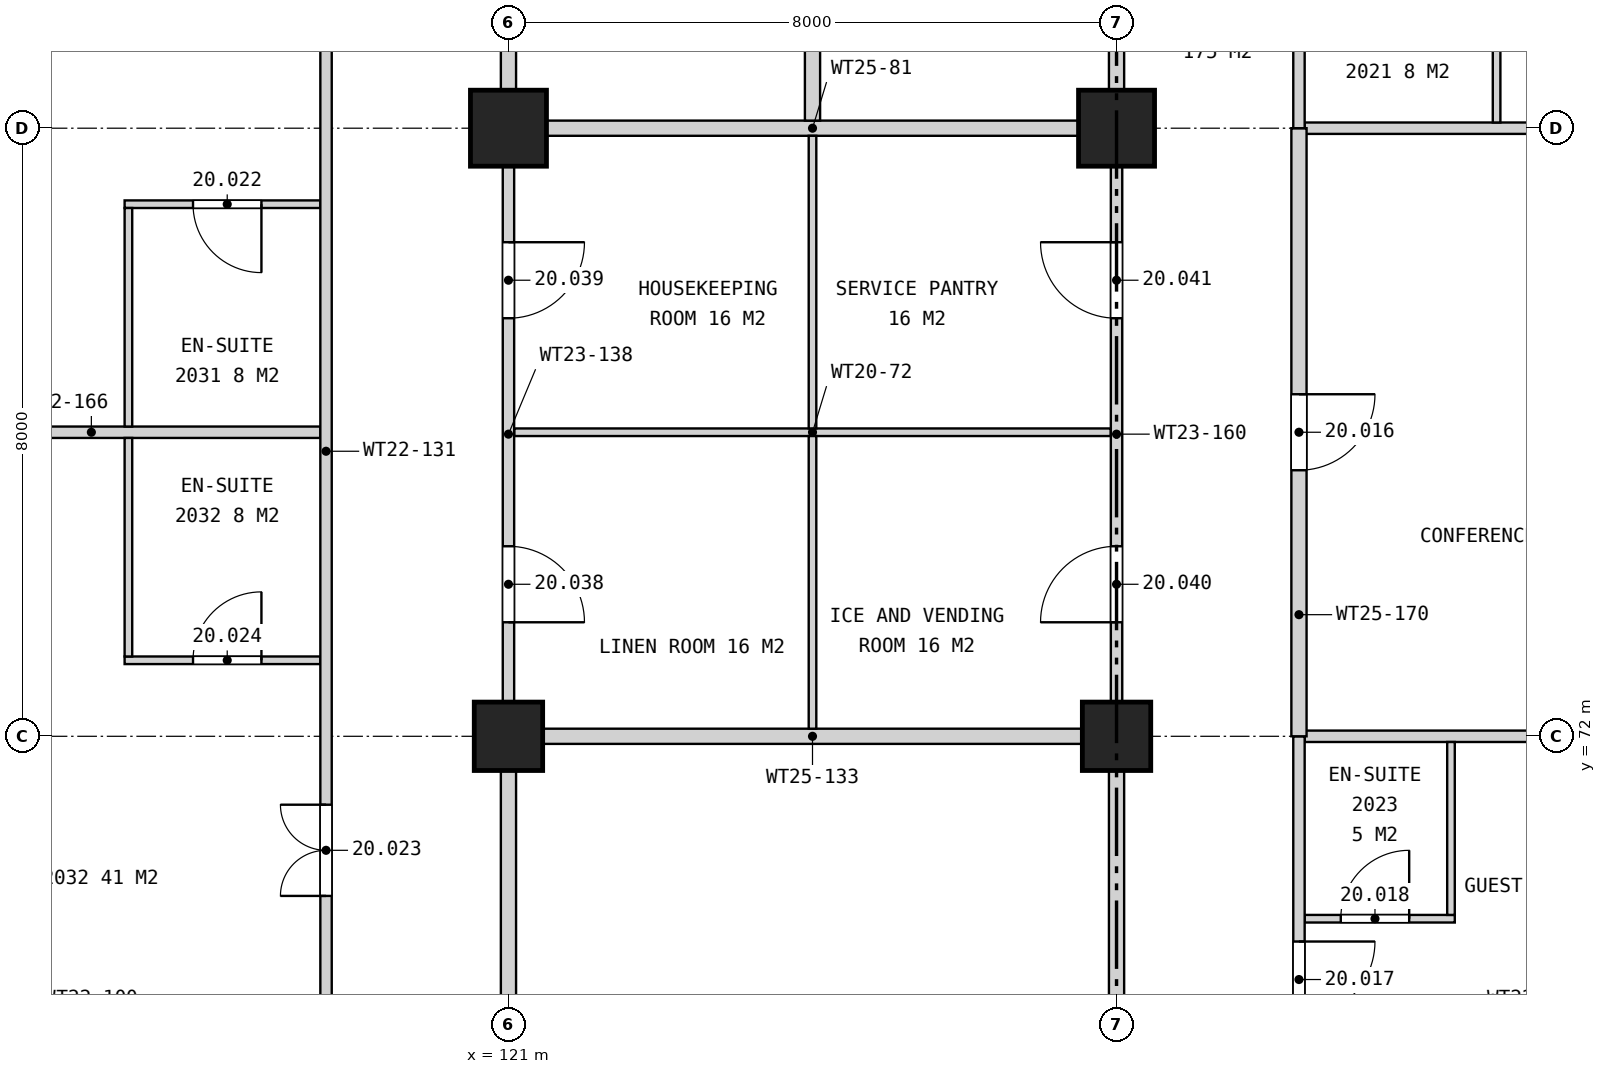
"""IFC4 building model, lengths in metres.
Left out: names, types, materials, properties, quantities, classifications, styles, units other than length and angle.
Written with IfcOpenShell. Run it as: python <this file> out.ifc"""

import sys

from ifc_helpers import new_model, si_unit, direction, frame, frame_2d, origin, origin_2d, place, context, subcontext, project, spatial, rectangle, extrude, element, fill, save


model = new_model("IFC4")
c1 = context("Model", 3, precision=1e-05, world=origin(), true_north=direction((0.0, 1.0)))
c2 = subcontext(c1, "Body", "Model", "MODEL_VIEW")
j1 = project(units=[si_unit("LENGTHUNIT", "METRE"), si_unit("PLANEANGLEUNIT", "RADIAN")], contexts=[c1])
p1 = place(None, origin())
s1 = spatial("IfcSite", under=j1, at=p1, CompositionType="ELEMENT")
p2 = place(p1, origin())
s2 = spatial("IfcBuilding", under=s1, at=p2, CompositionType="ELEMENT")
p3 = place(p2, frame((0.0, 0.0, 101.6)))
s3 = spatial("IfcBuildingStorey", under=s2, at=p3, CompositionType="ELEMENT", Elevation=101.6)
p4 = place(p3, frame((121.0, 72.0, 0.0), z_axis=(0.0, 0.0, 1.0), x_axis=(1.0, 0.0, 0.0)))
e1 = element("IfcColumn", 1, at=p4, inside=s3, PredefinedType="COLUMN", context=c2, shape_type="SweptSolid", body=[
    extrude(rectangle(XDim=0.9, YDim=0.9, at=origin_2d()), origin(), (0.0, 0.0, 1.0), 3.7),
])
p5 = place(p3, frame((121.0, 80.0, 0.0), z_axis=(0.0, 0.0, 1.0), x_axis=(1.0, 0.0, 0.0)))
e2 = element("IfcColumn", 2, at=p5, inside=s3, PredefinedType="COLUMN", context=c2, shape_type="SweptSolid", body=[
    extrude(rectangle(XDim=1.0, YDim=1.0, at=origin_2d()), origin(), (0.0, 0.0, 1.0), 3.7),
])
p6 = place(p3, frame((129.0, 72.0, 0.0), z_axis=(0.0, 0.0, 1.0), x_axis=(1.0, 0.0, 0.0)))
e3 = element("IfcColumn", 3, at=p6, inside=s3, PredefinedType="COLUMN", context=c2, shape_type="SweptSolid", body=[
    extrude(rectangle(XDim=0.9, YDim=0.9, at=origin_2d()), origin(), (0.0, 0.0, 1.0), 3.7),
])
p7 = place(p3, frame((129.0, 80.0, 0.0), z_axis=(0.0, 0.0, 1.0), x_axis=(1.0, 0.0, 0.0)))
e4 = element("IfcColumn", 4, at=p7, inside=s3, PredefinedType="COLUMN", context=c2, shape_type="SweptSolid", body=[
    extrude(rectangle(XDim=1.0, YDim=1.0, at=origin_2d()), origin(), (0.0, 0.0, 1.0), 3.7),
])
p8 = place(p3, frame((131.475, 69.6, 0.0), z_axis=(0.0, 0.0, 1.0), x_axis=(1.0, 0.0, 0.0)))
e5 = element("IfcWall", 5, at=p8, inside=s3, PredefinedType="PLUMBINGWALL", context=c2, shape_type="SweptSolid", body=[
    extrude(rectangle(XDim=1.975, YDim=0.1, at=frame_2d((0.987, 0.0))), origin(), (0.0, 0.0, 1.0), 3.7),
])
p9 = place(p8, frame((0.475, 0.0, 0.0)))
e6 = element("IfcOpeningElement", 6, at=p9, cuts=e5, PredefinedType="OPENING", context=c2, shape_type="SweptSolid", body=[
    extrude(rectangle(XDim=0.9, YDim=2.1, at=frame_2d((0.45, 1.05))), frame((0.0, 0.06, 0.0), z_axis=(0.0, -1.0, 0.0), x_axis=(1.0, 0.0, 0.0)), (0.0, 0.0, 1.0), 0.12),
])
p10 = place(p3, frame((121.45, 72.0, 0.0), z_axis=(0.0, 0.0, 1.0), x_axis=(1.0, 0.0, 0.0)))
e7 = element("IfcWall", 7, at=p10, inside=s3, PredefinedType="PARTITIONING", context=c2, shape_type="SweptSolid", body=[
    extrude(rectangle(XDim=7.1, YDim=0.2, at=frame_2d((3.55, 0.0))), origin(), (0.0, 0.0, 1.0), 2.76),
])
p11 = place(p3, frame((131.475, 72.0, 0.0), z_axis=(0.0, 0.0, 1.0), x_axis=(1.0, 0.0, 0.0)))
e8 = element("IfcWall", 8, at=p11, inside=s3, PredefinedType="PARTITIONING", context=c2, shape_type="SweptSolid", body=[
    extrude(rectangle(XDim=5.125, YDim=0.15, at=frame_2d((2.562, 0.0))), origin(), (0.0, 0.0, 1.0), 2.76),
])
p12 = place(p3, frame((115.95, 73.0, 0.0), z_axis=(0.0, 0.0, 1.0), x_axis=(1.0, 0.0, 0.0)))
e9 = element("IfcWall", 9, at=p12, inside=s3, PredefinedType="PLUMBINGWALL", context=c2, shape_type="SweptSolid", body=[
    extrude(rectangle(XDim=2.575, YDim=0.1, at=frame_2d((1.288, 0.0))), origin(), (0.0, 0.0, 1.0), 3.7),
])
p13 = place(p12, frame((0.9, 0.0, 0.0)))
e10 = element("IfcOpeningElement", 10, at=p13, cuts=e9, PredefinedType="OPENING", context=c2, shape_type="SweptSolid", body=[
    extrude(rectangle(XDim=0.9, YDim=2.1, at=frame_2d((0.45, 1.05))), frame((0.0, 0.06, 0.0), z_axis=(0.0, -1.0, 0.0), x_axis=(1.0, 0.0, 0.0)), (0.0, 0.0, 1.0), 0.12),
])
p14 = place(p3, frame((112.5, 76.0, 0.0), z_axis=(0.0, 0.0, 1.0), x_axis=(1.0, 0.0, 0.0)))
e11 = element("IfcWall", 11, at=p14, inside=s3, PredefinedType="PARTITIONING", context=c2, shape_type="SweptSolid", body=[
    extrude(rectangle(XDim=6.025, YDim=0.15, at=frame_2d((3.012, 0.0))), origin(), (0.0, 0.0, 1.0), 2.843),
])
p15 = place(p3, frame((121.075, 76.0, 0.0), z_axis=(0.0, 0.0, 1.0), x_axis=(1.0, 0.0, 0.0)))
e12 = element("IfcWall", 12, at=p15, inside=s3, PredefinedType="PARTITIONING", context=c2, shape_type="SweptSolid", body=[
    extrude(rectangle(XDim=7.85, YDim=0.1, at=frame_2d((3.925, 0.0))), origin(), (0.0, 0.0, 1.0), 2.843),
])
p16 = place(p3, frame((115.95, 79.0, 0.0), z_axis=(0.0, 0.0, 1.0), x_axis=(1.0, 0.0, 0.0)))
e13 = element("IfcWall", 13, at=p16, inside=s3, PredefinedType="PLUMBINGWALL", context=c2, shape_type="SweptSolid", body=[
    extrude(rectangle(XDim=2.575, YDim=0.1, at=frame_2d((1.288, 0.0))), origin(), (0.0, 0.0, 1.0), 3.7),
])
p17 = place(p16, frame((0.9, 0.0, 0.0)))
e14 = element("IfcOpeningElement", 14, at=p17, cuts=e13, PredefinedType="OPENING", context=c2, shape_type="SweptSolid", body=[
    extrude(rectangle(XDim=0.9, YDim=2.1, at=frame_2d((0.45, 1.05))), frame((0.0, 0.06, 0.0), z_axis=(0.0, -1.0, 0.0), x_axis=(1.0, 0.0, 0.0)), (0.0, 0.0, 1.0), 0.12),
])
p18 = place(p3, frame((121.5, 80.0, 0.0), z_axis=(0.0, 0.0, 1.0), x_axis=(1.0, 0.0, 0.0)))
e15 = element("IfcWall", 15, at=p18, inside=s3, PredefinedType="PARTITIONING", context=c2, shape_type="SweptSolid", body=[
    extrude(rectangle(XDim=7.0, YDim=0.2, at=frame_2d((3.5, 0.0))), origin(), (0.0, 0.0, 1.0), 2.76),
])
p19 = place(p3, frame((131.475, 80.0, 0.0), z_axis=(0.0, 0.0, 1.0), x_axis=(1.0, 0.0, 0.0)))
e16 = element("IfcWall", 16, at=p19, inside=s3, PredefinedType="PARTITIONING", context=c2, shape_type="SweptSolid", body=[
    extrude(rectangle(XDim=5.075, YDim=0.15, at=frame_2d((2.538, 0.0))), origin(), (0.0, 0.0, 1.0), 2.76),
])
for number, where, z_axis, x_axis in (
    (17, (116.0, 73.05, 0.0), (0.0, 0.0, 1.0), (0.0, 1.0, 0.0)),
    (18, (116.0, 76.075, 0.0), (0.0, 0.0, 1.0), (0.0, 1.0, 0.0)),
):
    element("IfcWall", number, at=place(p3, frame(where, z_axis=z_axis, x_axis=x_axis)), inside=s3, PredefinedType="PLUMBINGWALL", context=c2, shape_type="SweptSolid", body=[
        extrude(rectangle(XDim=2.875, YDim=0.1, at=frame_2d((1.438, 0.0))), origin(), (0.0, 0.0, 1.0), 3.7),
    ])
p20 = place(p3, frame((118.6, 63.5, 0.0), z_axis=(0.0, 0.0, 1.0), x_axis=(0.0, 1.0, 0.0)))
e19 = element("IfcWall", 19, at=p20, inside=s3, PredefinedType="PARTITIONING", context=c2, shape_type="SweptSolid", body=[
    extrude(rectangle(XDim=24.5, YDim=0.15, at=frame_2d((12.25, 0.0))), origin(), (0.0, 0.0, 1.0), 2.76),
])
p21 = place(p20, frame((19.4, 0.0, 0.0)))
e20 = element("IfcOpeningElement", 20, at=p21, cuts=e19, PredefinedType="OPENING", context=c2, shape_type="SweptSolid", body=[
    extrude(rectangle(XDim=1.2, YDim=2.2, at=frame_2d((0.6, 1.1))), frame((0.0, 0.085, 0.0), z_axis=(0.0, -1.0, 0.0), x_axis=(1.0, 0.0, 0.0)), (0.0, 0.0, 1.0), 0.17),
])
p22 = place(p20, frame((6.4, 0.0, 0.0)))
e21 = element("IfcOpeningElement", 21, at=p22, cuts=e19, PredefinedType="OPENING", context=c2, shape_type="SweptSolid", body=[
    extrude(rectangle(XDim=1.2, YDim=2.2, at=frame_2d((0.6, 1.1))), frame((0.0, 0.085, 0.0), z_axis=(0.0, -1.0, 0.0), x_axis=(1.0, 0.0, 0.0)), (0.0, 0.0, 1.0), 0.17),
])
p23 = place(p20, frame((3.2, 0.0, 0.0)))
e22 = element("IfcOpeningElement", 22, at=p23, cuts=e19, PredefinedType="OPENING", context=c2, shape_type="SweptSolid", body=[
    extrude(rectangle(XDim=1.0, YDim=2.1, at=frame_2d((0.5, 1.05))), frame((0.0, 0.085, 0.0), z_axis=(0.0, -1.0, 0.0), x_axis=(1.0, 0.0, 0.0)), (0.0, 0.0, 1.0), 0.17),
])
p24 = place(p3, frame((121.0, 64.3, 0.0), z_axis=(0.0, 0.0, 1.0), x_axis=(0.0, 1.0, 0.0)))
e23 = element("IfcWall", 23, at=p24, inside=s3, PredefinedType="PARTITIONING", context=c2, shape_type="SweptSolid", body=[
    extrude(rectangle(XDim=7.25, YDim=0.2, at=frame_2d((3.625, 0.0))), origin(), (0.0, 0.0, 1.0), 2.76),
])
p25 = place(p3, frame((121.0, 72.45, 0.0), z_axis=(0.0, 0.0, 1.0), x_axis=(0.0, 1.0, 0.0)))
e24 = element("IfcWall", 24, at=p25, inside=s3, PredefinedType="PARTITIONING", context=c2, shape_type="SweptSolid", body=[
    extrude(rectangle(XDim=7.05, YDim=0.15, at=frame_2d((3.525, 0.0))), origin(), (0.0, 0.0, 1.0), 2.76),
])
p26 = place(p25, frame((1.05, 0.0, 0.0)))
e25 = element("IfcOpeningElement", 25, at=p26, cuts=e24, PredefinedType="OPENING", context=c2, shape_type="SweptSolid", body=[
    extrude(rectangle(XDim=1.0, YDim=2.1, at=frame_2d((0.5, 1.05))), frame((0.0, 0.085, 0.0), z_axis=(0.0, -1.0, 0.0), x_axis=(1.0, 0.0, 0.0)), (0.0, 0.0, 1.0), 0.17),
])
p27 = place(p25, frame((5.05, 0.0, 0.0)))
e26 = element("IfcOpeningElement", 26, at=p27, cuts=e24, PredefinedType="OPENING", context=c2, shape_type="SweptSolid", body=[
    extrude(rectangle(XDim=1.0, YDim=2.1, at=frame_2d((0.5, 1.05))), frame((0.0, 0.085, 0.0), z_axis=(0.0, -1.0, 0.0), x_axis=(1.0, 0.0, 0.0)), (0.0, 0.0, 1.0), 0.17),
])
p28 = place(p3, frame((121.0, 80.5, 0.0), z_axis=(0.0, 0.0, 1.0), x_axis=(0.0, 1.0, 0.0)))
e27 = element("IfcWall", 27, at=p28, inside=s3, PredefinedType="PARTITIONING", context=c2, shape_type="SweptSolid", body=[
    extrude(rectangle(XDim=7.0, YDim=0.2, at=frame_2d((3.5, 0.0))), origin(), (0.0, 0.0, 1.0), 2.76),
])
p29 = place(p28, frame((3.0, 0.0, 0.0)))
e28 = element("IfcOpeningElement", 28, at=p29, cuts=e27, PredefinedType="OPENING", context=c2, shape_type="SweptSolid", body=[
    extrude(rectangle(XDim=1.0, YDim=2.1, at=frame_2d((0.5, 1.05))), frame((0.0, 0.11, 0.0), z_axis=(0.0, -1.0, 0.0), x_axis=(1.0, 0.0, 0.0)), (0.0, 0.0, 1.0), 0.22),
])
for number, where, z_axis, x_axis in (
    (29, (125.0, 72.1, 0.0), (0.0, 0.0, 1.0), (0.0, 1.0, 0.0)),
    (30, (125.0, 76.05, 0.0), (0.0, 0.0, 1.0), (0.0, 1.0, 0.0)),
):
    element("IfcWall", number, at=place(p3, frame(where, z_axis=z_axis, x_axis=x_axis)), inside=s3, PredefinedType="PARTITIONING", context=c2, shape_type="SweptSolid", body=[
        extrude(rectangle(XDim=3.85, YDim=0.1, at=frame_2d((1.925, 0.0))), origin(), (0.0, 0.0, 1.0), 3.7),
    ])
p30 = place(p3, frame((125.0, 80.1, 0.0), z_axis=(0.0, 0.0, 1.0), x_axis=(0.0, 1.0, 0.0)))
e31 = element("IfcWall", 31, at=p30, inside=s3, PredefinedType="PARTITIONING", context=c2, shape_type="SweptSolid", body=[
    extrude(rectangle(XDim=7.8, YDim=0.2, at=frame_2d((3.9, 0.0))), origin(), (0.0, 0.0, 1.0), 2.843),
])
p31 = place(p3, frame((129.0, 64.3, 0.0), z_axis=(0.0, 0.0, 1.0), x_axis=(0.0, 1.0, 0.0)))
e32 = element("IfcWall", 32, at=p31, inside=s3, PredefinedType="PARTITIONING", context=c2, shape_type="SweptSolid", body=[
    extrude(rectangle(XDim=7.25, YDim=0.2, at=frame_2d((3.625, 0.0))), origin(), (0.0, 0.0, 1.0), 2.76),
])
p32 = place(p31, frame((3.2, 0.0, 0.0)))
e33 = element("IfcOpeningElement", 33, at=p32, cuts=e32, PredefinedType="OPENING", context=c2, shape_type="SweptSolid", body=[
    extrude(rectangle(XDim=1.0, YDim=2.1, at=frame_2d((0.5, 1.05))), frame((0.0, 0.11, 0.0), z_axis=(0.0, -1.0, 0.0), x_axis=(1.0, 0.0, 0.0)), (0.0, 0.0, 1.0), 0.22),
])
p33 = place(p3, frame((129.0, 72.45, 0.0), z_axis=(0.0, 0.0, 1.0), x_axis=(0.0, 1.0, 0.0)))
e34 = element("IfcWall", 34, at=p33, inside=s3, PredefinedType="PARTITIONING", context=c2, shape_type="SweptSolid", body=[
    extrude(rectangle(XDim=7.05, YDim=0.15, at=frame_2d((3.525, 0.0))), origin(), (0.0, 0.0, 1.0), 2.76),
])
p34 = place(p33, frame((1.05, 0.0, 0.0)))
e35 = element("IfcOpeningElement", 35, at=p34, cuts=e34, PredefinedType="OPENING", context=c2, shape_type="SweptSolid", body=[
    extrude(rectangle(XDim=1.0, YDim=2.1, at=frame_2d((0.5, 1.05))), frame((0.0, 0.085, 0.0), z_axis=(0.0, -1.0, 0.0), x_axis=(1.0, 0.0, 0.0)), (0.0, 0.0, 1.0), 0.17),
])
p35 = place(p33, frame((5.05, 0.0, 0.0)))
e36 = element("IfcOpeningElement", 36, at=p35, cuts=e34, PredefinedType="OPENING", context=c2, shape_type="SweptSolid", body=[
    extrude(rectangle(XDim=1.0, YDim=2.1, at=frame_2d((0.5, 1.05))), frame((0.0, 0.085, 0.0), z_axis=(0.0, -1.0, 0.0), x_axis=(1.0, 0.0, 0.0)), (0.0, 0.0, 1.0), 0.17),
])
p36 = place(p3, frame((129.0, 80.5, 0.0), z_axis=(0.0, 0.0, 1.0), x_axis=(0.0, 1.0, 0.0)))
e37 = element("IfcWall", 37, at=p36, inside=s3, PredefinedType="PARTITIONING", context=c2, shape_type="SweptSolid", body=[
    extrude(rectangle(XDim=7.0, YDim=0.2, at=frame_2d((3.5, 0.0))), origin(), (0.0, 0.0, 1.0), 2.76),
])
p37 = place(p36, frame((3.0, 0.0, 0.0)))
e38 = element("IfcOpeningElement", 38, at=p37, cuts=e37, PredefinedType="OPENING", context=c2, shape_type="SweptSolid", body=[
    extrude(rectangle(XDim=1.0, YDim=2.1, at=frame_2d((0.5, 1.05))), frame((0.0, 0.11, 0.0), z_axis=(0.0, -1.0, 0.0), x_axis=(1.0, 0.0, 0.0)), (0.0, 0.0, 1.0), 0.22),
])
p38 = place(p3, frame((131.4, 63.5, 0.0), z_axis=(0.0, 0.0, 1.0), x_axis=(0.0, 1.0, 0.0)))
e39 = element("IfcWall", 39, at=p38, inside=s3, PredefinedType="PARTITIONING", context=c2, shape_type="SweptSolid", body=[
    extrude(rectangle(XDim=8.5, YDim=0.15, at=frame_2d((4.25, 0.0))), origin(), (0.0, 0.0, 1.0), 2.76),
])
p39 = place(p38, frame((4.8, 0.0, 0.0)))
e40 = element("IfcOpeningElement", 40, at=p39, cuts=e39, PredefinedType="OPENING", context=c2, shape_type="SweptSolid", body=[
    extrude(rectangle(XDim=1.0, YDim=2.1, at=frame_2d((0.5, 1.05))), frame((0.0, 0.085, 0.0), z_axis=(0.0, -1.0, 0.0), x_axis=(1.0, 0.0, 0.0)), (0.0, 0.0, 1.0), 0.17),
])
p40 = place(p38, frame((3.2, 0.0, 0.0)))
e41 = element("IfcOpeningElement", 41, at=p40, cuts=e39, PredefinedType="OPENING", context=c2, shape_type="SweptSolid", body=[
    extrude(rectangle(XDim=1.0, YDim=2.1, at=frame_2d((0.5, 1.05))), frame((0.0, 0.085, 0.0), z_axis=(0.0, -1.0, 0.0), x_axis=(1.0, 0.0, 0.0)), (0.0, 0.0, 1.0), 0.17),
])
p41 = place(p3, frame((131.4, 72.0, 0.0), z_axis=(0.0, 0.0, 1.0), x_axis=(0.0, 1.0, 0.0)))
e42 = element("IfcWall", 42, at=p41, inside=s3, PredefinedType="PARTITIONING", context=c2, shape_type="SweptSolid", body=[
    extrude(rectangle(XDim=8.0, YDim=0.2, at=frame_2d((4.0, 0.0))), origin(), (0.0, 0.0, 1.0), 2.76),
])
p42 = place(p41, frame((3.5, 0.0, 0.0)))
e43 = element("IfcOpeningElement", 43, at=p42, cuts=e42, PredefinedType="OPENING", context=c2, shape_type="SweptSolid", body=[
    extrude(rectangle(XDim=1.0, YDim=2.1, at=frame_2d((0.5, 1.05))), frame((0.0, 0.11, 0.0), z_axis=(0.0, -1.0, 0.0), x_axis=(1.0, 0.0, 0.0)), (0.0, 0.0, 1.0), 0.22),
])
p43 = place(p3, frame((131.4, 80.0, 0.0), z_axis=(0.0, 0.0, 1.0), x_axis=(0.0, 1.0, 0.0)))
e44 = element("IfcWall", 44, at=p43, inside=s3, PredefinedType="PARTITIONING", context=c2, shape_type="SweptSolid", body=[
    extrude(rectangle(XDim=8.0, YDim=0.15, at=frame_2d((4.0, 0.0))), origin(), (0.0, 0.0, 1.0), 2.76),
])
p44 = place(p43, frame((4.9, 0.0, 0.0)))
e45 = element("IfcOpeningElement", 45, at=p44, cuts=e44, PredefinedType="OPENING", context=c2, shape_type="SweptSolid", body=[
    extrude(rectangle(XDim=1.2, YDim=2.2, at=frame_2d((0.6, 1.1))), frame((0.0, 0.085, 0.0), z_axis=(0.0, -1.0, 0.0), x_axis=(1.0, 0.0, 0.0)), (0.0, 0.0, 1.0), 0.17),
])
p45 = place(p3, frame((133.4, 69.65, 0.0), z_axis=(0.0, 0.0, 1.0), x_axis=(0.0, 1.0, 0.0)))
e46 = element("IfcWall", 46, at=p45, inside=s3, PredefinedType="PLUMBINGWALL", context=c2, shape_type="SweptSolid", body=[
    extrude(rectangle(XDim=2.275, YDim=0.1, at=frame_2d((1.138, 0.0))), origin(), (0.0, 0.0, 1.0), 3.7),
])
p46 = place(p3, frame((134.0, 80.075, 0.0), z_axis=(0.0, 0.0, 1.0), x_axis=(0.0, 1.0, 0.0)))
e47 = element("IfcWall", 47, at=p46, inside=s3, PredefinedType="PLUMBINGWALL", context=c2, shape_type="SweptSolid", body=[
    extrude(rectangle(XDim=2.875, YDim=0.1, at=frame_2d((1.438, 0.0))), origin(), (0.0, 0.0, 1.0), 3.7),
])
p47 = place(p42, frame((1.0, 0.0, 0.0), z_axis=(0.0, 0.0, 1.0), x_axis=(-1.0, 0.0, 0.0)))
e48 = element("IfcDoor", 48, at=p47, inside=s3, OperationType="SINGLE_SWING_LEFT", PredefinedType="DOOR", context=c2, shape_type="SweptSolid", body=[
    extrude(rectangle(XDim=1.0, YDim=2.1, at=frame_2d((0.5, 1.05))), frame((0.0, 0.025, 0.0), z_axis=(0.0, -1.0, 0.0), x_axis=(1.0, 0.0, 0.0)), (0.0, 0.0, 1.0), 0.05),
])
fill(e43, e48)
p48 = place(p39, frame((1.0, 0.0, 0.0), z_axis=(0.0, 0.0, 1.0), x_axis=(-1.0, 0.0, 0.0)))
e49 = element("IfcDoor", 49, at=p48, inside=s3, OperationType="SINGLE_SWING_LEFT", PredefinedType="DOOR", context=c2, shape_type="SweptSolid", body=[
    extrude(rectangle(XDim=1.0, YDim=2.1, at=frame_2d((0.5, 1.05))), frame((0.0, 0.025, 0.0), z_axis=(0.0, -1.0, 0.0), x_axis=(1.0, 0.0, 0.0)), (0.0, 0.0, 1.0), 0.05),
])
fill(e40, e49)
p49 = place(p9, origin())
e50 = element("IfcDoor", 50, at=p49, inside=s3, OperationType="SINGLE_SWING_RIGHT", PredefinedType="DOOR", context=c2, shape_type="SweptSolid", body=[
    extrude(rectangle(XDim=0.9, YDim=2.1, at=frame_2d((0.45, 1.05))), frame((0.0, 0.025, 0.0), z_axis=(0.0, -1.0, 0.0), x_axis=(1.0, 0.0, 0.0)), (0.0, 0.0, 1.0), 0.05),
])
fill(e6, e50)
p50 = place(p17, frame((0.9, 0.0, 0.0), z_axis=(0.0, 0.0, 1.0), x_axis=(-1.0, 0.0, 0.0)))
e51 = element("IfcDoor", 51, at=p50, inside=s3, OperationType="SINGLE_SWING_LEFT", PredefinedType="DOOR", context=c2, shape_type="SweptSolid", body=[
    extrude(rectangle(XDim=0.9, YDim=2.1, at=frame_2d((0.45, 1.05))), frame((0.0, 0.025, 0.0), z_axis=(0.0, -1.0, 0.0), x_axis=(1.0, 0.0, 0.0)), (0.0, 0.0, 1.0), 0.05),
])
fill(e14, e51)
p51 = place(p22, origin())
e52 = element("IfcDoor", 52, at=p51, inside=s3, OperationType="DOUBLE_DOOR_SINGLE_SWING", PredefinedType="DOOR", context=c2, shape_type="SweptSolid", body=[
    extrude(rectangle(XDim=1.2, YDim=2.2, at=frame_2d((0.6, 1.1))), frame((0.0, 0.025, 0.0), z_axis=(0.0, -1.0, 0.0), x_axis=(1.0, 0.0, 0.0)), (0.0, 0.0, 1.0), 0.05),
])
fill(e21, e52)
p52 = place(p13, origin())
e53 = element("IfcDoor", 53, at=p52, inside=s3, OperationType="SINGLE_SWING_RIGHT", PredefinedType="DOOR", context=c2, shape_type="SweptSolid", body=[
    extrude(rectangle(XDim=0.9, YDim=2.1, at=frame_2d((0.45, 1.05))), frame((0.0, 0.025, 0.0), z_axis=(0.0, -1.0, 0.0), x_axis=(1.0, 0.0, 0.0)), (0.0, 0.0, 1.0), 0.05),
])
fill(e10, e53)
p53 = place(p26, frame((1.0, 0.0, 0.0), z_axis=(0.0, 0.0, 1.0), x_axis=(-1.0, 0.0, 0.0)))
e54 = element("IfcDoor", 54, at=p53, inside=s3, OperationType="SINGLE_SWING_RIGHT", PredefinedType="DOOR", context=c2, shape_type="SweptSolid", body=[
    extrude(rectangle(XDim=1.0, YDim=2.1, at=frame_2d((0.5, 1.05))), frame((0.0, 0.025, 0.0), z_axis=(0.0, -1.0, 0.0), x_axis=(1.0, 0.0, 0.0)), (0.0, 0.0, 1.0), 0.05),
])
fill(e25, e54)
p54 = place(p27, frame((1.0, 0.0, 0.0), z_axis=(0.0, 0.0, 1.0), x_axis=(-1.0, 0.0, 0.0)))
e55 = element("IfcDoor", 55, at=p54, inside=s3, OperationType="SINGLE_SWING_LEFT", PredefinedType="DOOR", context=c2, shape_type="SweptSolid", body=[
    extrude(rectangle(XDim=1.0, YDim=2.1, at=frame_2d((0.5, 1.05))), frame((0.0, 0.025, 0.0), z_axis=(0.0, -1.0, 0.0), x_axis=(1.0, 0.0, 0.0)), (0.0, 0.0, 1.0), 0.05),
])
fill(e26, e55)
p55 = place(p34, origin())
e56 = element("IfcDoor", 56, at=p55, inside=s3, OperationType="SINGLE_SWING_LEFT", PredefinedType="DOOR", context=c2, shape_type="SweptSolid", body=[
    extrude(rectangle(XDim=1.0, YDim=2.1, at=frame_2d((0.5, 1.05))), frame((0.0, 0.025, 0.0), z_axis=(0.0, -1.0, 0.0), x_axis=(1.0, 0.0, 0.0)), (0.0, 0.0, 1.0), 0.05),
])
fill(e35, e56)
p56 = place(p35, origin())
e57 = element("IfcDoor", 57, at=p56, inside=s3, OperationType="SINGLE_SWING_RIGHT", PredefinedType="DOOR", context=c2, shape_type="SweptSolid", body=[
    extrude(rectangle(XDim=1.0, YDim=2.1, at=frame_2d((0.5, 1.05))), frame((0.0, 0.025, 0.0), z_axis=(0.0, -1.0, 0.0), x_axis=(1.0, 0.0, 0.0)), (0.0, 0.0, 1.0), 0.05),
])
fill(e36, e57)
save(model, sys.argv[1])
